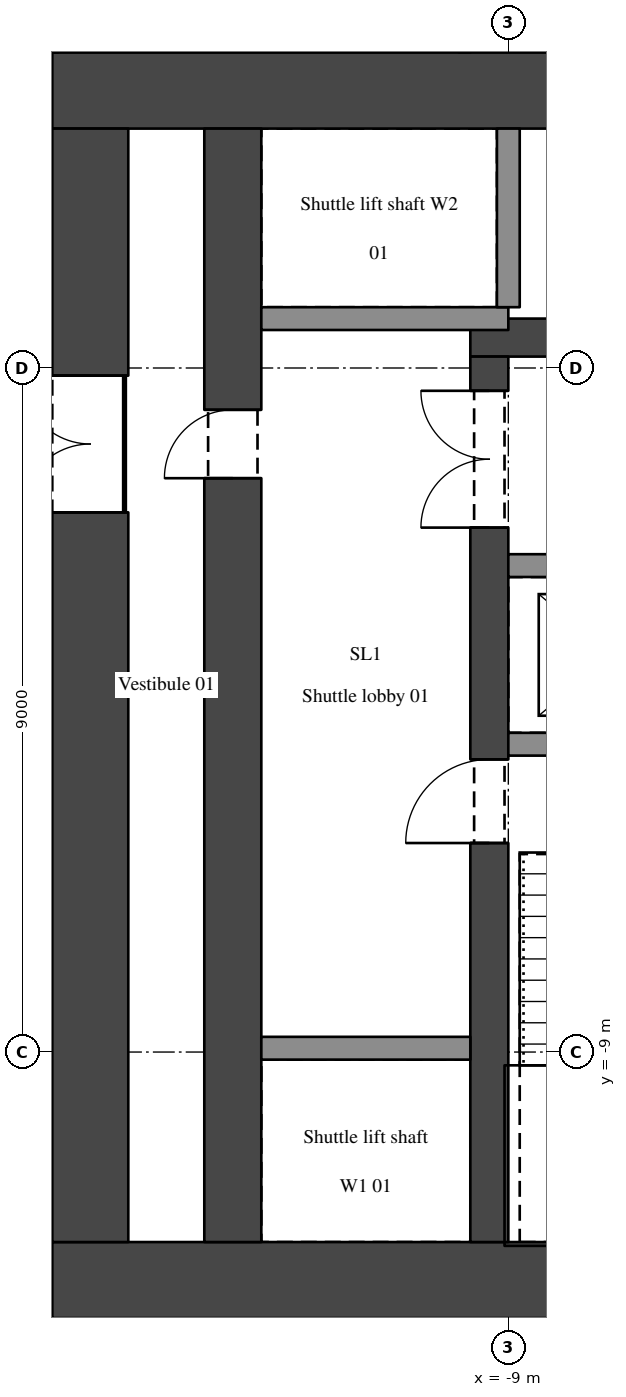
"""IFC4 building model, lengths in metres.
Left out: names, types, materials, properties, quantities, classifications, styles, units other than length and angle.
Written with IfcOpenShell. Run it as: python <this file> out.ifc"""

import sys

from ifc_helpers import new_model, si_unit, direction, frame, frame_2d, origin, place, context, subcontext, project, spatial, rectangle, extrude, element, fill, save


model = new_model("IFC4")
c1 = context("Model", 3, precision=1e-05, world=origin(), true_north=direction((0.0, 1.0)))
c2 = subcontext(c1, "Body", "Model", "MODEL_VIEW")
j1 = project(units=[si_unit("LENGTHUNIT", "METRE"), si_unit("PLANEANGLEUNIT", "RADIAN")], contexts=[c1])
p1 = place(None, origin())
s1 = spatial("IfcSite", under=j1, at=p1, CompositionType="ELEMENT")
p2 = place(p1, origin())
s2 = spatial("IfcBuilding", under=s1, at=p2, CompositionType="ELEMENT")
p3 = place(p2, frame((0.0, 0.0, 62.1)))
s3 = spatial("IfcBuildingStorey", under=s2, at=p3, CompositionType="ELEMENT", Elevation=62.1)
for number, where, z_axis, x_axis in (
    (1, (-15.0, -12.0, 0.0), (0.0, 0.0, 1.0), (1.0, 0.0, 0.0)),
    (2, (-15.0, 3.65, 0.0), (0.0, 0.0, 1.0), (1.0, 0.0, 0.0)),
):
    element("IfcWall", number, at=place(p3, frame(where, z_axis=z_axis, x_axis=x_axis)), inside=s3, PredefinedType="SHEAR", context=c2, shape_type="SweptSolid", body=[
        extrude(rectangle(XDim=30.0, YDim=1.0, at=frame_2d((15.0, 0.0))), origin(), (0.0, 0.0, 1.0), 3.9),
    ])
p4 = place(p3, frame((-14.5, -11.5, 0.0), z_axis=(0.0, 0.0, 1.0), x_axis=(0.0, 1.0, 0.0)))
e3 = element("IfcWall", 3, at=p4, inside=s3, PredefinedType="SHEAR", context=c2, shape_type="SweptSolid", body=[
    extrude(rectangle(XDim=14.65, YDim=1.0, at=frame_2d((7.325, 0.0))), origin(), (0.0, 0.0, 1.0), 3.9),
])
p5 = place(p4, frame((9.6, 0.0, 0.0)))
e4 = element("IfcOpeningElement", 4, at=p5, cuts=e3, PredefinedType="OPENING", context=c2, shape_type="SweptSolid", body=[
    extrude(rectangle(XDim=1.8, YDim=2.1, at=frame_2d((0.9, 1.05))), frame((0.0, 0.51, 0.0), z_axis=(0.0, -1.0, 0.0), x_axis=(1.0, 0.0, 0.0)), (0.0, 0.0, 1.0), 1.02),
])
p6 = place(p3, frame((-12.625, -11.5, 0.0), z_axis=(0.0, 0.0, 1.0), x_axis=(0.0, 1.0, 0.0)))
e5 = element("IfcWall", 5, at=p6, inside=s3, PredefinedType="SHEAR", context=c2, shape_type="SweptSolid", body=[
    extrude(rectangle(XDim=14.65, YDim=0.75, at=frame_2d((7.325, 0.0))), origin(), (0.0, 0.0, 1.0), 3.9),
])
p7 = place(p6, frame((10.05, 0.0, 0.0)))
e6 = element("IfcOpeningElement", 6, at=p7, cuts=e5, PredefinedType="OPENING", context=c2, shape_type="SweptSolid", body=[
    extrude(rectangle(XDim=0.9, YDim=2.1, at=frame_2d((0.45, 1.05))), frame((0.0, 0.385, 0.0), z_axis=(0.0, -1.0, 0.0), x_axis=(1.0, 0.0, 0.0)), (0.0, 0.0, 1.0), 0.77),
])
p8 = place(p3, frame((-9.5, 0.4, 0.0), z_axis=(0.0, 0.0, 1.0), x_axis=(1.0, 0.0, 0.0)))
e7 = element("IfcWall", 7, at=p8, inside=s3, PredefinedType="SHEAR", context=c2, shape_type="SweptSolid", body=[
    extrude(rectangle(XDim=19.0, YDim=0.5, at=frame_2d((9.5, 0.0))), origin(), (0.0, 0.0, 1.0), 3.9),
])
p9 = place(p8, frame((1.4, 0.0, 0.0)))
e8 = element("IfcOpeningElement", 8, at=p9, cuts=e7, PredefinedType="OPENING", context=c2, shape_type="SweptSolid", body=[
    extrude(rectangle(XDim=0.9, YDim=2.1, at=frame_2d((0.45, 1.05))), frame((0.0, 0.26, 0.0), z_axis=(0.0, -1.0, 0.0), x_axis=(1.0, 0.0, 0.0)), (0.0, 0.0, 1.0), 0.52),
])
p10 = place(p8, frame((4.1, 0.0, 0.0)))
e9 = element("IfcOpeningElement", 9, at=p10, cuts=e7, PredefinedType="OPENING", context=c2, shape_type="SweptSolid", body=[
    extrude(rectangle(XDim=0.9, YDim=2.1, at=frame_2d((0.45, 1.05))), frame((0.0, 0.26, 0.0), z_axis=(0.0, -1.0, 0.0), x_axis=(1.0, 0.0, 0.0)), (0.0, 0.0, 1.0), 0.52),
])
p11 = place(p8, frame((6.8, 0.0, 0.0)))
e10 = element("IfcOpeningElement", 10, at=p11, cuts=e7, PredefinedType="OPENING", context=c2, shape_type="SweptSolid", body=[
    extrude(rectangle(XDim=0.9, YDim=2.1, at=frame_2d((0.45, 1.05))), frame((0.0, 0.26, 0.0), z_axis=(0.0, -1.0, 0.0), x_axis=(1.0, 0.0, 0.0)), (0.0, 0.0, 1.0), 0.52),
])
p12 = place(p8, frame((11.3, 0.0, 0.0)))
e11 = element("IfcOpeningElement", 11, at=p12, cuts=e7, PredefinedType="OPENING", context=c2, shape_type="SweptSolid", body=[
    extrude(rectangle(XDim=0.9, YDim=2.1, at=frame_2d((0.45, 1.05))), frame((0.0, 0.26, 0.0), z_axis=(0.0, -1.0, 0.0), x_axis=(1.0, 0.0, 0.0)), (0.0, 0.0, 1.0), 0.52),
])
p13 = place(p8, frame((14.0, 0.0, 0.0)))
e12 = element("IfcOpeningElement", 12, at=p13, cuts=e7, PredefinedType="OPENING", context=c2, shape_type="SweptSolid", body=[
    extrude(rectangle(XDim=0.9, YDim=2.1, at=frame_2d((0.45, 1.05))), frame((0.0, 0.26, 0.0), z_axis=(0.0, -1.0, 0.0), x_axis=(1.0, 0.0, 0.0)), (0.0, 0.0, 1.0), 0.52),
])
p14 = place(p8, frame((16.7, 0.0, 0.0)))
e13 = element("IfcOpeningElement", 13, at=p14, cuts=e7, PredefinedType="OPENING", context=c2, shape_type="SweptSolid", body=[
    extrude(rectangle(XDim=0.9, YDim=2.1, at=frame_2d((0.45, 1.05))), frame((0.0, 0.26, 0.0), z_axis=(0.0, -1.0, 0.0), x_axis=(1.0, 0.0, 0.0)), (0.0, 0.0, 1.0), 0.52),
])
p15 = place(p8, frame((9.05, 0.0, 0.0)))
e14 = element("IfcOpeningElement", 14, at=p15, cuts=e7, PredefinedType="OPENING", context=c2, shape_type="SweptSolid", body=[
    extrude(rectangle(XDim=0.9, YDim=2.1, at=frame_2d((0.45, 1.05))), frame((0.0, 0.26, 0.0), z_axis=(0.0, -1.0, 0.0), x_axis=(1.0, 0.0, 0.0)), (0.0, 0.0, 1.0), 0.52),
])
p16 = place(p3, frame((-9.25, -11.5, 0.0), z_axis=(0.0, 0.0, 1.0), x_axis=(0.0, 1.0, 0.0)))
e15 = element("IfcWall", 15, at=p16, inside=s3, PredefinedType="SHEAR", context=c2, shape_type="SweptSolid", body=[
    extrude(rectangle(XDim=11.65, YDim=0.5, at=frame_2d((5.825, 0.0))), origin(), (0.0, 0.0, 1.0), 3.9),
])
p17 = place(p16, frame((9.4, 0.0, 0.0)))
e16 = element("IfcOpeningElement", 16, at=p17, cuts=e15, PredefinedType="OPENING", context=c2, shape_type="SweptSolid", body=[
    extrude(rectangle(XDim=1.8, YDim=2.1, at=frame_2d((0.9, 1.05))), frame((0.0, 0.26, 0.0), z_axis=(0.0, -1.0, 0.0), x_axis=(1.0, 0.0, 0.0)), (0.0, 0.0, 1.0), 0.52),
])
p18 = place(p16, frame((5.25, 0.0, 0.0)))
e17 = element("IfcOpeningElement", 17, at=p18, cuts=e15, PredefinedType="OPENING", context=c2, shape_type="SweptSolid", body=[
    extrude(rectangle(XDim=1.1, YDim=2.1, at=frame_2d((0.55, 1.05))), frame((0.0, 0.26, 0.0), z_axis=(0.0, -1.0, 0.0), x_axis=(1.0, 0.0, 0.0)), (0.0, 0.0, 1.0), 0.52),
])
p19 = place(p3, frame((-12.25, -8.95, 0.0), z_axis=(0.0, 0.0, 1.0), x_axis=(1.0, 0.0, 0.0)))
e18 = element("IfcWall", 18, at=p19, inside=s3, PredefinedType="SHEAR", context=c2, shape_type="SweptSolid", body=[
    extrude(rectangle(XDim=2.75, YDim=0.3, at=frame_2d((1.375, 0.0))), origin(), (0.0, 0.0, 1.0), 3.9),
])
p20 = place(p3, frame((-9.0, -4.95, 0.0), z_axis=(0.0, 0.0, 1.0), x_axis=(1.0, 0.0, 0.0)))
e19 = element("IfcWall", 19, at=p20, inside=s3, PredefinedType="SHEAR", context=c2, shape_type="SweptSolid", body=[
    extrude(rectangle(XDim=8.1, YDim=0.3, at=frame_2d((4.05, 0.0))), origin(), (0.0, 0.0, 1.0), 3.9),
])
p21 = place(p3, frame((-9.0, -2.6, 0.0), z_axis=(0.0, 0.0, 1.0), x_axis=(1.0, 0.0, 0.0)))
e20 = element("IfcWall", 20, at=p21, inside=s3, PredefinedType="SHEAR", context=c2, shape_type="SweptSolid", body=[
    extrude(rectangle(XDim=8.1, YDim=0.3, at=frame_2d((4.05, 0.0))), origin(), (0.0, 0.0, 1.0), 3.9),
])
p22 = place(p21, frame((0.8, 0.0, 0.0)))
e21 = element("IfcOpeningElement", 21, at=p22, cuts=e20, PredefinedType="OPENING", context=c2, shape_type="SweptSolid", body=[
    extrude(rectangle(XDim=1.1, YDim=2.1, at=frame_2d((0.55, 1.05))), frame((0.0, 0.16, 0.0), z_axis=(0.0, -1.0, 0.0), x_axis=(1.0, 0.0, 0.0)), (0.0, 0.0, 1.0), 0.32),
])
p23 = place(p21, frame((3.5, 0.0, 0.0)))
e22 = element("IfcOpeningElement", 22, at=p23, cuts=e20, PredefinedType="OPENING", context=c2, shape_type="SweptSolid", body=[
    extrude(rectangle(XDim=1.1, YDim=2.1, at=frame_2d((0.55, 1.05))), frame((0.0, 0.16, 0.0), z_axis=(0.0, -1.0, 0.0), x_axis=(1.0, 0.0, 0.0)), (0.0, 0.0, 1.0), 0.32),
])
p24 = place(p21, frame((6.2, 0.0, 0.0)))
e23 = element("IfcOpeningElement", 23, at=p24, cuts=e20, PredefinedType="OPENING", context=c2, shape_type="SweptSolid", body=[
    extrude(rectangle(XDim=1.1, YDim=2.1, at=frame_2d((0.55, 1.05))), frame((0.0, 0.16, 0.0), z_axis=(0.0, -1.0, 0.0), x_axis=(1.0, 0.0, 0.0)), (0.0, 0.0, 1.0), 0.32),
])
p25 = place(p3, frame((-9.0, 0.65, 0.0), z_axis=(0.0, 0.0, 1.0), x_axis=(-1.0, 0.0, 0.0)))
e24 = element("IfcWall", 24, at=p25, inside=s3, PredefinedType="SHEAR", context=c2, shape_type="SweptSolid", body=[
    extrude(rectangle(XDim=3.25, YDim=0.3, at=frame_2d((1.625, 0.0))), origin(), (0.0, 0.0, 1.0), 3.9),
])
p26 = place(p3, frame((-9.575, 4.15, 0.0), z_axis=(0.0, 0.0, 1.0), x_axis=(0.0, 1.0, 0.0)))
e25 = element("IfcWall", 25, at=p26, inside=s3, PredefinedType="PARTITIONING", context=c2, shape_type="SweptSolid", body=[
    extrude(rectangle(XDim=5.38, YDim=0.15, at=frame_2d((2.69, 0.0))), origin(), (0.0, 0.0, 1.0), 2.96),
])
p27 = place(p3, frame((-9.0, 0.8, 0.0), z_axis=(0.0, 0.0, 1.0), x_axis=(0.0, 1.0, 0.0)))
e26 = element("IfcWall", 26, at=p27, inside=s3, PredefinedType="SHEAR", context=c2, shape_type="SweptSolid", body=[
    extrude(rectangle(XDim=2.35, YDim=0.3, at=frame_2d((1.175, 0.0))), origin(), (0.0, 0.0, 1.0), 3.9),
])
p28 = place(p5, origin())
e27 = element("IfcDoor", 27, at=p28, inside=s3, OperationType="DOUBLE_DOOR_SINGLE_SWING", PredefinedType="DOOR", context=c2, shape_type="SweptSolid", body=[
    extrude(rectangle(XDim=1.8, YDim=2.1, at=frame_2d((0.9, 1.05))), frame((0.0, 0.025, 0.0), z_axis=(0.0, -1.0, 0.0), x_axis=(1.0, 0.0, 0.0)), (0.0, 0.0, 1.0), 0.05),
])
fill(e4, e27)
p29 = place(p17, origin())
e28 = element("IfcDoor", 28, at=p29, inside=s3, OperationType="DOUBLE_DOOR_SINGLE_SWING", PredefinedType="DOOR", context=c2, shape_type="SweptSolid", body=[
    extrude(rectangle(XDim=1.8, YDim=2.1, at=frame_2d((0.9, 1.05))), frame((0.0, 0.025, 0.0), z_axis=(0.0, -1.0, 0.0), x_axis=(1.0, 0.0, 0.0)), (0.0, 0.0, 1.0), 0.05),
])
fill(e16, e28)
p30 = place(p18, origin())
e29 = element("IfcDoor", 29, at=p30, inside=s3, OperationType="SINGLE_SWING_LEFT", PredefinedType="DOOR", context=c2, shape_type="SweptSolid", body=[
    extrude(rectangle(XDim=1.1, YDim=2.1, at=frame_2d((0.55, 1.05))), frame((0.0, 0.025, 0.0), z_axis=(0.0, -1.0, 0.0), x_axis=(1.0, 0.0, 0.0)), (0.0, 0.0, 1.0), 0.05),
])
fill(e17, e29)
p31 = place(p7, origin())
e30 = element("IfcDoor", 30, at=p31, inside=s3, OperationType="SINGLE_SWING_LEFT", PredefinedType="DOOR", context=c2, shape_type="SweptSolid", body=[
    extrude(rectangle(XDim=0.9, YDim=2.1, at=frame_2d((0.45, 1.05))), frame((0.0, 0.025, 0.0), z_axis=(0.0, -1.0, 0.0), x_axis=(1.0, 0.0, 0.0)), (0.0, 0.0, 1.0), 0.05),
])
fill(e6, e30)
save(model, sys.argv[1])
